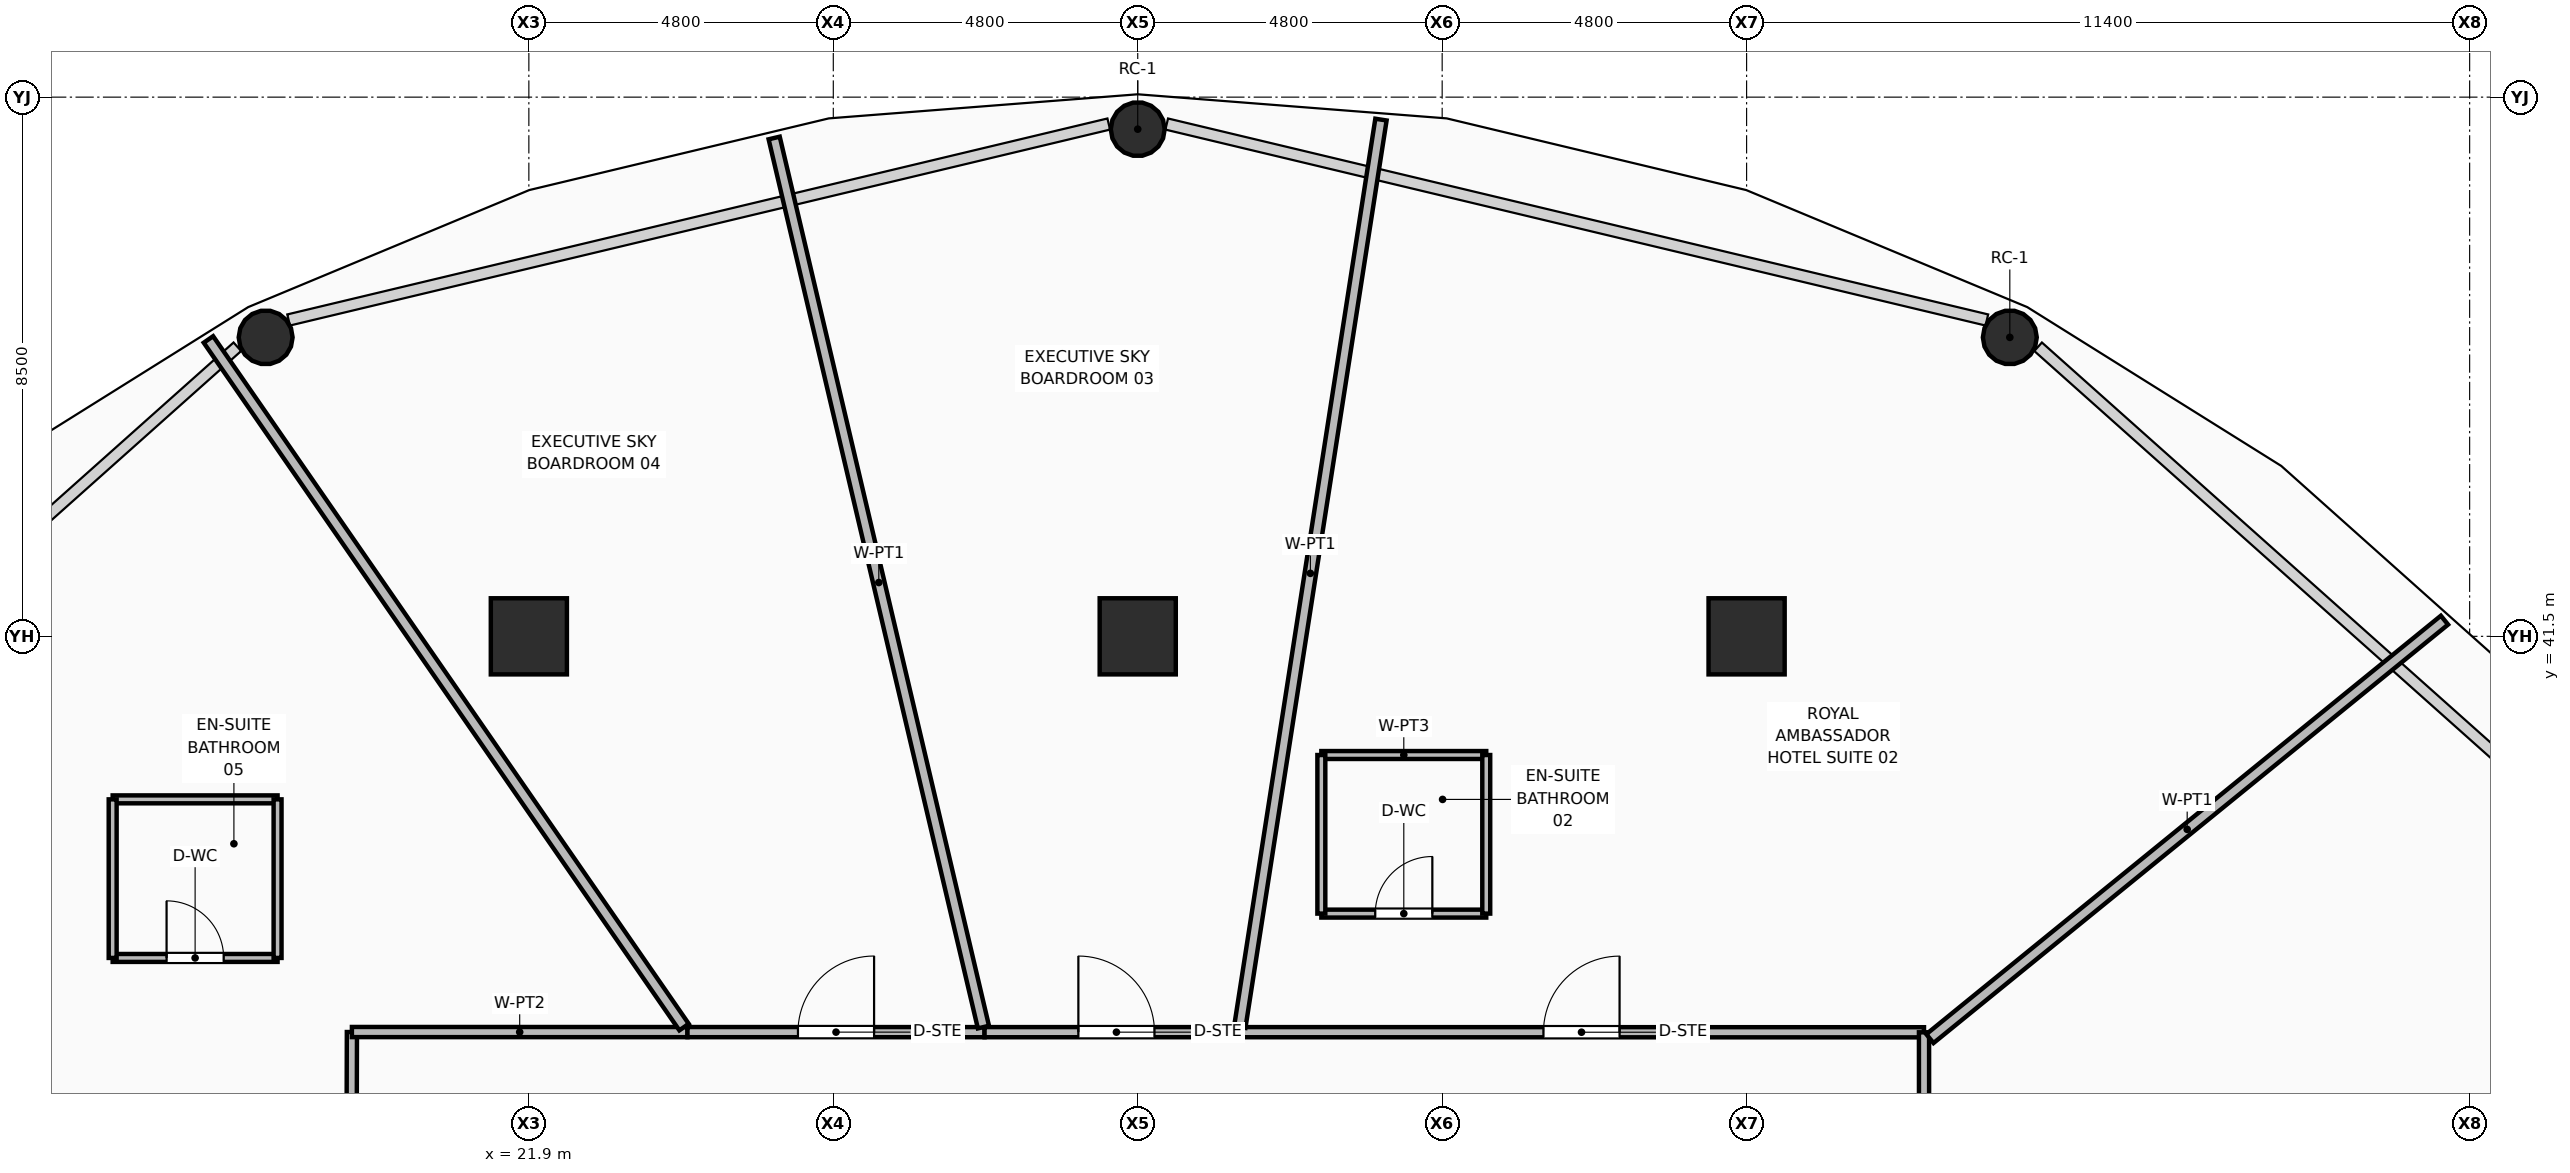
"""IFC4 building model, lengths in metres.
Left out: names, types, materials, properties, quantities, classifications, styles, units other than length and angle.
Written with IfcOpenShell. Run it as: python <this file> out.ifc"""

import sys

from ifc_helpers import new_model, si_unit, direction, frame, frame_2d, origin, origin_2d, place, context, subcontext, project, spatial, rectangle, hollow_rectangle, hollow_circle, extrude, element, fill, save


model = new_model("IFC4")
c1 = context("Model", 3, precision=1e-05, world=origin(), true_north=direction((0.0, 1.0)))
c2 = subcontext(c1, "Body", "Model", "MODEL_VIEW")
j1 = project(units=[si_unit("LENGTHUNIT", "METRE"), si_unit("PLANEANGLEUNIT", "RADIAN")], contexts=[c1])
p1 = place(None, origin())
s1 = spatial("IfcSite", under=j1, at=p1, CompositionType="ELEMENT")
p2 = place(p1, origin())
s2 = spatial("IfcBuilding", under=s1, at=p2, CompositionType="ELEMENT")
p3 = place(p2, frame((0.0, 0.0, 87.0)))
s3 = spatial("IfcBuildingStorey", under=s2, at=p3, CompositionType="ELEMENT", Elevation=87.0)
for number, where, z_axis, x_axis in (
    (1, (21.9, 41.5, 0.0), (0.0, 0.0, 1.0), (1.0, 0.0, 0.0)),
    (2, (31.5, 41.5, 0.0), (0.0, 0.0, 1.0), (1.0, 0.0, 0.0)),
    (3, (41.1, 41.5, 0.0), (0.0, 0.0, 1.0), (1.0, 0.0, 0.0)),
):
    element("IfcColumn", number, at=place(p3, frame(where, z_axis=z_axis, x_axis=x_axis)), inside=s3, PredefinedType="COLUMN", context=c2, shape_type="SweptSolid", body=[
        extrude(hollow_rectangle(XDim=1.2, YDim=1.2, WallThickness=0.045, at=origin_2d()), origin(), (0.0, 0.0, 1.0), 3.75),
    ])
p4 = place(p3, frame((45.25, 46.213, 0.0), z_axis=(-0.063867569811, -0.098710723407, 0.993064512814), x_axis=(0.839585964149, -0.543226848383, 0.0)))
e4 = element("IfcColumn", 4, at=p4, inside=s3, PredefinedType="COLUMN", context=c2, shape_type="SweptSolid", body=[
    extrude(hollow_circle(Radius=0.425, WallThickness=0.04, at=origin_2d()), origin(), (0.0, 0.0, 1.0), 3.524),
])
p5 = place(p3, frame((31.5, 49.495, 0.0), z_axis=(0.0, -0.114134855821, 0.993465265969), x_axis=(1.0, 0.0, 0.0)))
e5 = element("IfcColumn", 5, at=p5, inside=s3, PredefinedType="COLUMN", context=c2, shape_type="SweptSolid", body=[
    extrude(hollow_circle(Radius=0.425, WallThickness=0.04, at=origin_2d()), origin(), (0.0, 0.0, 1.0), 3.523),
])
p6 = place(p3, frame((17.75, 46.213, 0.0), z_axis=(0.063867569811, -0.098710723407, 0.993064512814), x_axis=(0.839585964149, 0.543226848383, 0.0)))
e6 = element("IfcColumn", 6, at=p6, inside=s3, PredefinedType="COLUMN", context=c2, shape_type="SweptSolid", body=[
    extrude(hollow_circle(Radius=0.425, WallThickness=0.04, at=origin_2d()), origin(), (0.0, 0.0, 1.0), 3.524),
])
p7 = place(p3, frame((19.093, 28.641, 0.0), z_axis=(0.0, 0.0, 1.0), x_axis=(0.002581207523, 0.999996668678, 0.0)))
e7 = element("IfcWall", 7, at=p7, inside=s3, PredefinedType="PARTITIONING", context=c2, shape_type="SweptSolid", body=[
    extrude(rectangle(XDim=6.621, YDim=0.16, at=frame_2d((3.311, 0.0))), origin(), (0.0, 0.0, 1.0), 2.858),
])
p8 = place(p7, frame((0.597, 0.0, 0.0)))
e8 = element("IfcOpeningElement", 8, at=p8, cuts=e7, PredefinedType="OPENING", context=c2, shape_type="SweptSolid", body=[
    extrude(rectangle(XDim=1.2, YDim=2.1, at=frame_2d((0.6, 1.05))), frame((0.0, 0.09, 0.0), z_axis=(0.0, -1.0, 0.0), x_axis=(1.0, 0.0, 0.0)), (0.0, 0.0, 1.0), 0.18),
])
p9 = place(p3, frame((19.11, 35.262, 0.0), z_axis=(0.0, 0.0, 1.0), x_axis=(0.999999982965, -0.000184578466, 0.0)))
e9 = element("IfcWall", 9, at=p9, inside=s3, PredefinedType="PARTITIONING", context=c2, shape_type="SweptSolid", body=[
    extrude(rectangle(XDim=5.291, YDim=0.16, at=frame_2d((2.646, 0.0))), origin(), (0.0, 0.0, 1.0), 2.858),
])
p10 = place(p3, frame((24.401, 35.261, 0.0), z_axis=(0.0, 0.0, 1.0), x_axis=(0.999999978267, -0.000208485349, 0.0)))
e10 = element("IfcWall", 10, at=p10, inside=s3, PredefinedType="PARTITIONING", context=c2, shape_type="SweptSolid", body=[
    extrude(rectangle(XDim=4.684, YDim=0.16, at=frame_2d((2.342, 0.0))), origin(), (0.0, 0.0, 1.0), 3.48),
])
p11 = place(p10, frame((1.742, 0.0, 0.0)))
e11 = element("IfcOpeningElement", 11, at=p11, cuts=e10, PredefinedType="OPENING", context=c2, shape_type="SweptSolid", body=[
    extrude(rectangle(XDim=1.2, YDim=2.1, at=frame_2d((0.6, 1.05))), frame((0.0, 0.09, 0.0), z_axis=(0.0, -1.0, 0.0), x_axis=(1.0, 0.0, 0.0)), (0.0, 0.0, 1.0), 0.18),
])
p12 = place(p3, frame((29.085, 35.26, 0.0), z_axis=(0.0, 0.0, 1.0), x_axis=(1.0, 0.0, 0.0)))
e12 = element("IfcWall", 12, at=p12, inside=s3, PredefinedType="PARTITIONING", context=c2, shape_type="SweptSolid", body=[
    extrude(rectangle(XDim=4.011, YDim=0.16, at=frame_2d((2.005, 0.0))), origin(), (0.0, 0.0, 1.0), 2.858),
])
p13 = place(p12, frame((1.479, 0.0, 0.0)))
e13 = element("IfcOpeningElement", 13, at=p13, cuts=e12, PredefinedType="OPENING", context=c2, shape_type="SweptSolid", body=[
    extrude(rectangle(XDim=1.2, YDim=2.1, at=frame_2d((0.6, 1.05))), frame((0.0, 0.09, 0.0), z_axis=(0.0, -1.0, 0.0), x_axis=(1.0, 0.0, 0.0)), (0.0, 0.0, 1.0), 0.18),
])
p14 = place(p3, frame((33.096, 35.26, 0.0), z_axis=(0.0, 0.0, 1.0), x_axis=(0.999999983651, -0.000180827736, 0.0)))
e14 = element("IfcWall", 14, at=p14, inside=s3, PredefinedType="PARTITIONING", context=c2, shape_type="SweptSolid", body=[
    extrude(rectangle(XDim=10.801, YDim=0.16, at=frame_2d((5.4, 0.0))), origin(), (0.0, 0.0, 1.0), 2.858),
])
p15 = place(p14, frame((4.801, 0.0, 0.0)))
e15 = element("IfcOpeningElement", 15, at=p15, cuts=e14, PredefinedType="OPENING", context=c2, shape_type="SweptSolid", body=[
    extrude(rectangle(XDim=1.2, YDim=2.1, at=frame_2d((0.6, 1.05))), frame((0.0, 0.09, 0.0), z_axis=(0.0, -1.0, 0.0), x_axis=(1.0, 0.0, 0.0)), (0.0, 0.0, 1.0), 0.18),
])
p16 = place(p3, frame((43.897, 35.258, 0.0), z_axis=(0.0, 0.0, 1.0), x_axis=(0.000519608986, -0.999999865003, 0.0)))
e16 = element("IfcWall", 16, at=p16, inside=s3, PredefinedType="PARTITIONING", context=c2, shape_type="SweptSolid", body=[
    extrude(rectangle(XDim=9.867, YDim=0.16, at=frame_2d((4.934, 0.0))), origin(), (0.0, 0.0, 1.0), 2.858),
])
p17 = place(p16, frame((5.228, 0.0, 0.0)))
e17 = element("IfcOpeningElement", 17, at=p17, cuts=e16, PredefinedType="OPENING", context=c2, shape_type="SweptSolid", body=[
    extrude(rectangle(XDim=1.2, YDim=2.1, at=frame_2d((0.6, 1.05))), frame((0.0, 0.09, 0.0), z_axis=(0.0, -1.0, 0.0), x_axis=(1.0, 0.0, 0.0)), (0.0, 0.0, 1.0), 0.18),
])
p18 = place(p3, frame((43.99, 35.158, 0.0), z_axis=(0.0, 0.0, 1.0), x_axis=(0.775876125328, 0.630885281288, 0.0)))
e18 = element("IfcWall", 18, at=p18, inside=s3, PredefinedType="PARTITIONING", context=c2, shape_type="SweptSolid", body=[
    extrude(rectangle(XDim=10.457, YDim=0.18, at=frame_2d((5.228, 0.0))), origin(), (0.0, 0.0, 1.0), 2.705),
])
p19 = place(p3, frame((33.109, 35.34, 0.0), z_axis=(0.0, 0.0, 1.0), x_axis=(0.153754935782, 0.988109012064, 0.0)))
e19 = element("IfcWall", 19, at=p19, inside=s3, PredefinedType="PARTITIONING", context=c2, shape_type="SweptSolid", body=[
    extrude(rectangle(XDim=14.478, YDim=0.18, at=frame_2d((7.239, 0.0))), origin(), (0.0, 0.0, 1.0), 2.705),
])
p20 = place(p3, frame((29.067, 35.34, 0.0), z_axis=(0.0, 0.0, 1.0), x_axis=(-0.229103597598, 0.973402045184, 0.0)))
e20 = element("IfcWall", 20, at=p20, inside=s3, PredefinedType="PARTITIONING", context=c2, shape_type="SweptSolid", body=[
    extrude(rectangle(XDim=14.399, YDim=0.18, at=frame_2d((7.199, 0.0))), origin(), (0.0, 0.0, 1.0), 2.705),
])
p21 = place(p3, frame((24.347, 35.34, 0.0), z_axis=(0.0, 0.0, 1.0), x_axis=(-0.568928704045, 0.822386849186, 0.0)))
e21 = element("IfcWall", 21, at=p21, inside=s3, PredefinedType="PARTITIONING", context=c2, shape_type="SweptSolid", body=[
    extrude(rectangle(XDim=13.181, YDim=0.18, at=frame_2d((6.59, 0.0))), origin(), (0.0, 0.0, 1.0), 2.705),
])
p22 = place(p3, frame((34.395, 37.129, 0.0), z_axis=(0.0, 0.0, 1.0), x_axis=(1.0, 0.0, 0.0)))
e22 = element("IfcWall", 22, at=p22, inside=s3, PredefinedType="PARTITIONING", context=c2, shape_type="SweptSolid", body=[
    extrude(rectangle(XDim=2.6, YDim=0.125, at=frame_2d((1.3, 0.0))), origin(), (0.0, 0.0, 1.0), 3.48),
])
p23 = place(p22, frame((0.85, 0.0, 0.0)))
e23 = element("IfcOpeningElement", 23, at=p23, cuts=e22, PredefinedType="OPENING", context=c2, shape_type="SweptSolid", body=[
    extrude(rectangle(XDim=0.9, YDim=2.1, at=frame_2d((0.45, 1.05))), frame((0.0, 0.073, 0.0), z_axis=(0.0, -1.0, 0.0), x_axis=(1.0, 0.0, 0.0)), (0.0, 0.0, 1.0), 0.145),
])
p24 = place(p3, frame((34.395, 39.629, 0.0), z_axis=(0.0, 0.0, 1.0), x_axis=(1.0, 0.0, 0.0)))
e24 = element("IfcWall", 24, at=p24, inside=s3, PredefinedType="PARTITIONING", context=c2, shape_type="SweptSolid", body=[
    extrude(rectangle(XDim=2.6, YDim=0.125, at=frame_2d((1.3, 0.0))), origin(), (0.0, 0.0, 1.0), 3.48),
])
for number, where, z_axis, x_axis in (
    (25, (34.395, 37.129, 0.0), (0.0, 0.0, 1.0), (0.0, 1.0, 0.0)),
    (26, (36.995, 37.129, 0.0), (0.0, 0.0, 1.0), (0.0, 1.0, 0.0)),
):
    element("IfcWall", number, at=place(p3, frame(where, z_axis=z_axis, x_axis=x_axis)), inside=s3, PredefinedType="PARTITIONING", context=c2, shape_type="SweptSolid", body=[
        extrude(rectangle(XDim=2.5, YDim=0.125, at=frame_2d((1.25, 0.0))), origin(), (0.0, 0.0, 1.0), 3.48),
    ])
p25 = place(p3, frame((15.338, 36.43, 0.0), z_axis=(0.0, 0.0, 1.0), x_axis=(1.0, 0.0, 0.0)))
e27 = element("IfcWall", 27, at=p25, inside=s3, PredefinedType="PARTITIONING", context=c2, shape_type="SweptSolid", body=[
    extrude(rectangle(XDim=2.6, YDim=0.125, at=frame_2d((1.3, 0.0))), origin(), (0.0, 0.0, 1.0), 3.48),
])
p26 = place(p25, frame((0.85, 0.0, 0.0)))
e28 = element("IfcOpeningElement", 28, at=p26, cuts=e27, PredefinedType="OPENING", context=c2, shape_type="SweptSolid", body=[
    extrude(rectangle(XDim=0.9, YDim=2.1, at=frame_2d((0.45, 1.05))), frame((0.0, 0.073, 0.0), z_axis=(0.0, -1.0, 0.0), x_axis=(1.0, 0.0, 0.0)), (0.0, 0.0, 1.0), 0.145),
])
p27 = place(p3, frame((15.338, 38.93, 0.0), z_axis=(0.0, 0.0, 1.0), x_axis=(1.0, 0.0, 0.0)))
e29 = element("IfcWall", 29, at=p27, inside=s3, PredefinedType="PARTITIONING", context=c2, shape_type="SweptSolid", body=[
    extrude(rectangle(XDim=2.6, YDim=0.125, at=frame_2d((1.3, 0.0))), origin(), (0.0, 0.0, 1.0), 3.48),
])
for number, where, z_axis, x_axis in (
    (30, (15.338, 36.43, 0.0), (0.0, 0.0, 1.0), (0.0, 1.0, 0.0)),
    (31, (17.938, 36.43, 0.0), (0.0, 0.0, 1.0), (0.0, 1.0, 0.0)),
):
    element("IfcWall", number, at=place(p3, frame(where, z_axis=z_axis, x_axis=x_axis)), inside=s3, PredefinedType="PARTITIONING", context=c2, shape_type="SweptSolid", body=[
        extrude(rectangle(XDim=2.5, YDim=0.125, at=frame_2d((1.25, 0.0))), origin(), (0.0, 0.0, 1.0), 3.48),
    ])
p28 = place(p23, origin())
e32 = element("IfcDoor", 32, at=p28, inside=s3, OperationType="SINGLE_SWING_RIGHT", PredefinedType="DOOR", context=c2, shape_type="SweptSolid", body=[
    extrude(rectangle(XDim=0.9, YDim=2.1, at=frame_2d((0.45, 1.05))), frame((0.0, 0.025, 0.0), z_axis=(0.0, -1.0, 0.0), x_axis=(1.0, 0.0, 0.0)), (0.0, 0.0, 1.0), 0.05),
])
fill(e23, e32)
p29 = place(p15, origin())
e33 = element("IfcDoor", 33, at=p29, inside=s3, OperationType="SINGLE_SWING_RIGHT", PredefinedType="DOOR", context=c2, shape_type="SweptSolid", body=[
    extrude(rectangle(XDim=1.2, YDim=2.1, at=frame_2d((0.6, 1.05))), frame((0.0, 0.025, 0.0), z_axis=(0.0, -1.0, 0.0), x_axis=(1.0, 0.0, 0.0)), (0.0, 0.0, 1.0), 0.05),
])
fill(e15, e33)
p30 = place(p13, origin())
e34 = element("IfcDoor", 34, at=p30, inside=s3, OperationType="SINGLE_SWING_LEFT", PredefinedType="DOOR", context=c2, shape_type="SweptSolid", body=[
    extrude(rectangle(XDim=1.2, YDim=2.1, at=frame_2d((0.6, 1.05))), frame((0.0, 0.025, 0.0), z_axis=(0.0, -1.0, 0.0), x_axis=(1.0, 0.0, 0.0)), (0.0, 0.0, 1.0), 0.05),
])
fill(e13, e34)
p31 = place(p11, origin())
e35 = element("IfcDoor", 35, at=p31, inside=s3, OperationType="SINGLE_SWING_RIGHT", PredefinedType="DOOR", context=c2, shape_type="SweptSolid", body=[
    extrude(rectangle(XDim=1.2, YDim=2.1, at=frame_2d((0.6, 1.05))), frame((0.0, 0.025, 0.0), z_axis=(0.0, -1.0, 0.0), x_axis=(1.0, 0.0, 0.0)), (0.0, 0.0, 1.0), 0.05),
])
fill(e11, e35)
p32 = place(p26, origin())
e36 = element("IfcDoor", 36, at=p32, inside=s3, OperationType="SINGLE_SWING_LEFT", PredefinedType="DOOR", context=c2, shape_type="SweptSolid", body=[
    extrude(rectangle(XDim=0.9, YDim=2.1, at=frame_2d((0.45, 1.05))), frame((0.0, 0.025, 0.0), z_axis=(0.0, -1.0, 0.0), x_axis=(1.0, 0.0, 0.0)), (0.0, 0.0, 1.0), 0.05),
])
fill(e28, e36)
save(model, sys.argv[1])
